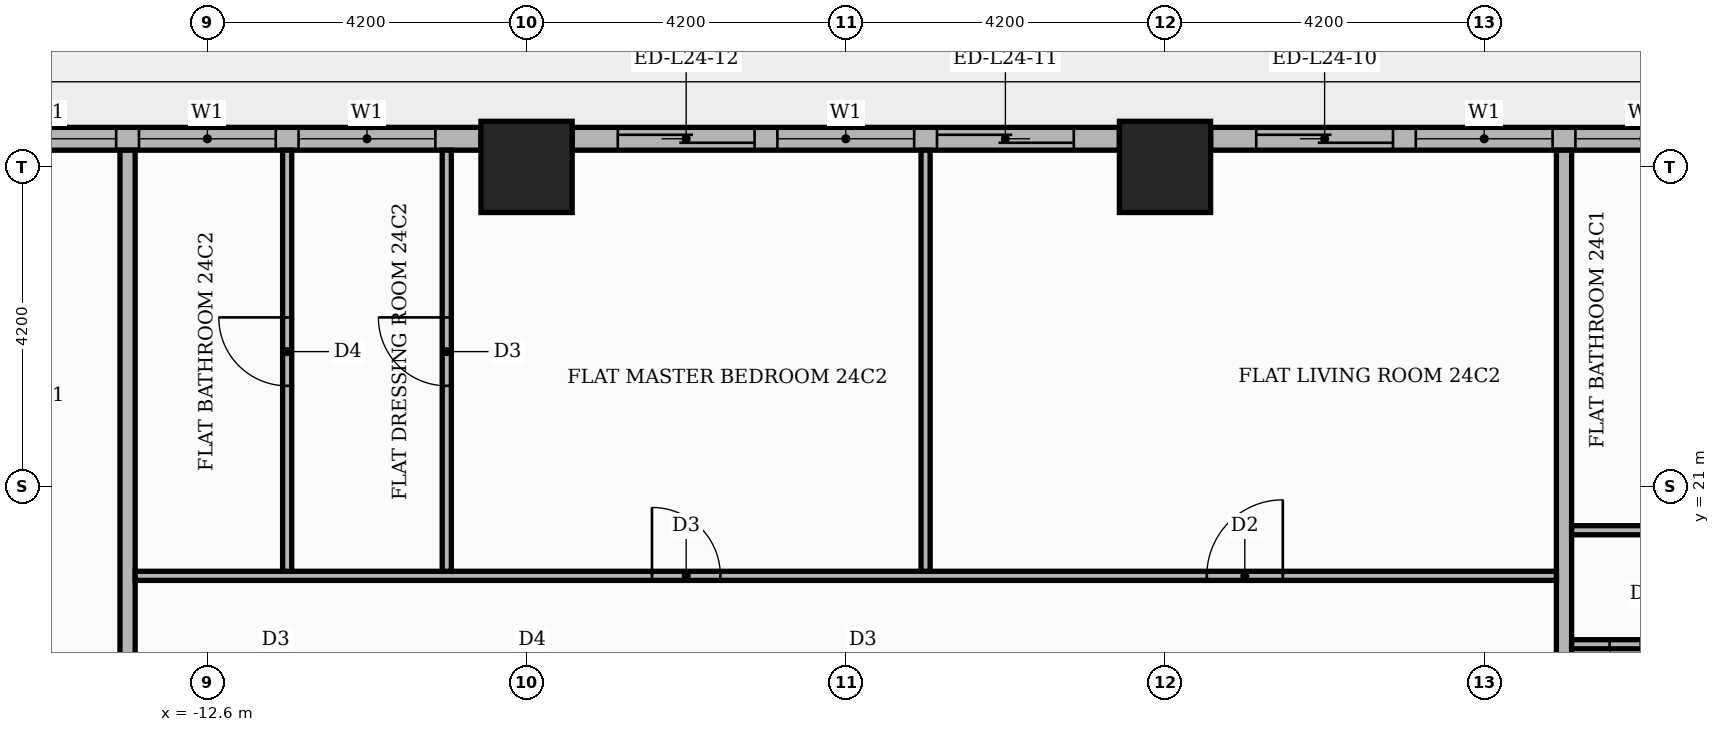
"""IFC4 building model, lengths in metres.
Left out: names, types, materials, properties, quantities, classifications, styles, units other than length and angle.
Written with IfcOpenShell. Run it as: python <this file> out.ifc"""

import sys

from ifc_helpers import new_model, si_unit, direction, frame, frame_2d, origin, origin_2d, place, context, subcontext, project, spatial, rectangle, extrude, element, fill, save


model = new_model("IFC4")
c1 = context("Model", 3, precision=1e-05, world=origin(), true_north=direction((0.0, 1.0)))
c2 = subcontext(c1, "Body", "Model", "MODEL_VIEW")
j1 = project(units=[si_unit("LENGTHUNIT", "METRE"), si_unit("PLANEANGLEUNIT", "RADIAN")], contexts=[c1])
p1 = place(None, origin())
s1 = spatial("IfcSite", under=j1, at=p1, CompositionType="ELEMENT")
p2 = place(p1, origin())
s2 = spatial("IfcBuilding", under=s1, at=p2, CompositionType="ELEMENT")
p3 = place(p2, frame((0.0, 0.0, 102.6)))
s3 = spatial("IfcBuildingStorey", under=s2, at=p3, CompositionType="ELEMENT", Elevation=102.6)
for number, where, z_axis, x_axis in (
    (1, (0.0, 25.2, 0.0), (0.0, 0.0, 1.0), (1.0, 0.0, 0.0)),
    (2, (-8.4, 25.2, 0.0), (0.0, 0.0, 1.0), (1.0, 0.0, 0.0)),
):
    element("IfcColumn", number, at=place(p3, frame(where, z_axis=z_axis, x_axis=x_axis)), inside=s3, PredefinedType="COLUMN", context=c2, shape_type="SweptSolid", body=[
        extrude(rectangle(XDim=1.2, YDim=1.2, at=origin_2d()), origin(), (0.0, 0.0, 1.0), 3.9),
    ])
p4 = place(p3, frame((7.8, 25.57, 0.0), z_axis=(0.0, 0.0, 1.0), x_axis=(-1.0, 0.0, 0.0)))
e3 = element("IfcWall", 3, at=p4, inside=s3, PredefinedType="STANDARD", context=c2, shape_type="SweptSolid", body=[
    extrude(rectangle(XDim=7.2, YDim=0.3, at=frame_2d((3.6, 0.0))), origin(), (0.0, 0.0, 1.0), 3.48),
])
p5 = place(p4, frame((0.6, 0.0, 0.9)))
e4 = element("IfcOpeningElement", 4, at=p5, cuts=e3, PredefinedType="OPENING", context=c2, shape_type="SweptSolid", body=[
    extrude(rectangle(XDim=1.8, YDim=2.1, at=frame_2d((0.9, 1.05))), frame((0.0, 0.16, 0.0), z_axis=(0.0, -1.0, 0.0), x_axis=(1.0, 0.0, 0.0)), (0.0, 0.0, 1.0), 0.32),
])
p6 = place(p4, frame((2.7, 0.0, 0.9)))
e5 = element("IfcOpeningElement", 5, at=p6, cuts=e3, PredefinedType="OPENING", context=c2, shape_type="SweptSolid", body=[
    extrude(rectangle(XDim=1.8, YDim=2.1, at=frame_2d((0.9, 1.05))), frame((0.0, 0.16, 0.0), z_axis=(0.0, -1.0, 0.0), x_axis=(1.0, 0.0, 0.0)), (0.0, 0.0, 1.0), 0.32),
])
p7 = place(p4, frame((4.8, 0.0, 0.0)))
e6 = element("IfcOpeningElement", 6, at=p7, cuts=e3, PredefinedType="OPENING", context=c2, shape_type="SweptSolid", body=[
    extrude(rectangle(XDim=1.8, YDim=2.4, at=frame_2d((0.9, 1.2))), frame((0.0, 0.16, 0.0), z_axis=(0.0, -1.0, 0.0), x_axis=(1.0, 0.0, 0.0)), (0.0, 0.0, 1.0), 0.32),
])
p8 = place(p3, frame((-0.6, 25.57, 0.0), z_axis=(0.0, 0.0, 1.0), x_axis=(-1.0, 0.0, 0.0)))
e7 = element("IfcWall", 7, at=p8, inside=s3, PredefinedType="STANDARD", context=c2, shape_type="SweptSolid", body=[
    extrude(rectangle(XDim=7.2, YDim=0.3, at=frame_2d((3.6, 0.0))), origin(), (0.0, 0.0, 1.0), 3.48),
])
p9 = place(p8, frame((0.6, 0.0, 0.0)))
e8 = element("IfcOpeningElement", 8, at=p9, cuts=e7, PredefinedType="OPENING", context=c2, shape_type="SweptSolid", body=[
    extrude(rectangle(XDim=1.8, YDim=2.4, at=frame_2d((0.9, 1.2))), frame((0.0, 0.16, 0.0), z_axis=(0.0, -1.0, 0.0), x_axis=(1.0, 0.0, 0.0)), (0.0, 0.0, 1.0), 0.32),
])
p10 = place(p8, frame((2.7, 0.0, 0.9)))
e9 = element("IfcOpeningElement", 9, at=p10, cuts=e7, PredefinedType="OPENING", context=c2, shape_type="SweptSolid", body=[
    extrude(rectangle(XDim=1.8, YDim=2.1, at=frame_2d((0.9, 1.05))), frame((0.0, 0.16, 0.0), z_axis=(0.0, -1.0, 0.0), x_axis=(1.0, 0.0, 0.0)), (0.0, 0.0, 1.0), 0.32),
])
p11 = place(p8, frame((4.8, 0.0, 0.0)))
e10 = element("IfcOpeningElement", 10, at=p11, cuts=e7, PredefinedType="OPENING", context=c2, shape_type="SweptSolid", body=[
    extrude(rectangle(XDim=1.8, YDim=2.4, at=frame_2d((0.9, 1.2))), frame((0.0, 0.16, 0.0), z_axis=(0.0, -1.0, 0.0), x_axis=(1.0, 0.0, 0.0)), (0.0, 0.0, 1.0), 0.32),
])
p12 = place(p3, frame((-9.0, 25.57, 0.0), z_axis=(0.0, 0.0, 1.0), x_axis=(-1.0, 0.0, 0.0)))
e11 = element("IfcWall", 11, at=p12, inside=s3, PredefinedType="STANDARD", context=c2, shape_type="SweptSolid", body=[
    extrude(rectangle(XDim=7.2, YDim=0.3, at=frame_2d((3.6, 0.0))), origin(), (0.0, 0.0, 1.0), 3.48),
])
p13 = place(p12, frame((0.6, 0.0, 0.9)))
e12 = element("IfcOpeningElement", 12, at=p13, cuts=e11, PredefinedType="OPENING", context=c2, shape_type="SweptSolid", body=[
    extrude(rectangle(XDim=1.8, YDim=2.1, at=frame_2d((0.9, 1.05))), frame((0.0, 0.16, 0.0), z_axis=(0.0, -1.0, 0.0), x_axis=(1.0, 0.0, 0.0)), (0.0, 0.0, 1.0), 0.32),
])
p14 = place(p12, frame((2.7, 0.0, 0.9)))
e13 = element("IfcOpeningElement", 13, at=p14, cuts=e11, PredefinedType="OPENING", context=c2, shape_type="SweptSolid", body=[
    extrude(rectangle(XDim=1.8, YDim=2.1, at=frame_2d((0.9, 1.05))), frame((0.0, 0.16, 0.0), z_axis=(0.0, -1.0, 0.0), x_axis=(1.0, 0.0, 0.0)), (0.0, 0.0, 1.0), 0.32),
])
p15 = place(p12, frame((4.8, 0.0, 0.9)))
e14 = element("IfcOpeningElement", 14, at=p15, cuts=e11, PredefinedType="OPENING", context=c2, shape_type="SweptSolid", body=[
    extrude(rectangle(XDim=1.8, YDim=2.1, at=frame_2d((0.9, 1.05))), frame((0.0, 0.16, 0.0), z_axis=(0.0, -1.0, 0.0), x_axis=(1.0, 0.0, 0.0)), (0.0, 0.0, 1.0), 0.32),
])
for number, where, z_axis, x_axis in (
    (15, (-13.65, 13.75, 0.0), (0.0, 0.0, 1.0), (0.0, 1.0, 0.0)),
    (16, (5.25, 13.75, 0.0), (0.0, 0.0, 1.0), (0.0, 1.0, 0.0)),
):
    element("IfcWall", number, at=place(p3, frame(where, z_axis=z_axis, x_axis=x_axis)), inside=s3, PredefinedType="PARTITIONING", context=c2, shape_type="SweptSolid", body=[
        extrude(rectangle(XDim=11.67, YDim=0.2, at=frame_2d((5.835, 0.0))), origin(), (0.0, 0.0, 1.0), 3.48),
    ])
p16 = place(p3, frame((5.35, 18.92, 0.0), z_axis=(0.0, 0.0, 1.0), x_axis=(1.0, 0.0, 0.0)))
e17 = element("IfcWall", 17, at=p16, inside=s3, PredefinedType="PARTITIONING", context=c2, shape_type="SweptSolid", body=[
    extrude(rectangle(XDim=4.1, YDim=0.12, at=frame_2d((2.05, 0.0))), origin(), (0.0, 0.0, 1.0), 3.48),
])
p17 = place(p16, frame((0.5, 0.0, 0.0)))
e18 = element("IfcOpeningElement", 18, at=p17, cuts=e17, PredefinedType="OPENING", context=c2, shape_type="SweptSolid", body=[
    extrude(rectangle(XDim=0.9, YDim=2.1, at=frame_2d((0.45, 1.05))), frame((0.0, 0.07, 0.0), z_axis=(0.0, -1.0, 0.0), x_axis=(1.0, 0.0, 0.0)), (0.0, 0.0, 1.0), 0.14),
])
p18 = place(p3, frame((-13.55, 19.82, 0.0), z_axis=(0.0, 0.0, 1.0), x_axis=(1.0, 0.0, 0.0)))
e19 = element("IfcWall", 19, at=p18, inside=s3, PredefinedType="PARTITIONING", context=c2, shape_type="SweptSolid", body=[
    extrude(rectangle(XDim=18.7, YDim=0.12, at=frame_2d((9.35, 0.0))), origin(), (0.0, 0.0, 1.0), 3.48),
])
p19 = place(p18, frame((14.1, 0.0, 0.0)))
e20 = element("IfcOpeningElement", 20, at=p19, cuts=e19, PredefinedType="OPENING", context=c2, shape_type="SweptSolid", body=[
    extrude(rectangle(XDim=1.0, YDim=2.1, at=frame_2d((0.5, 1.05))), frame((0.0, 0.07, 0.0), z_axis=(0.0, -1.0, 0.0), x_axis=(1.0, 0.0, 0.0)), (0.0, 0.0, 1.0), 0.14),
])
p20 = place(p18, frame((6.8, 0.0, 0.0)))
e21 = element("IfcOpeningElement", 21, at=p20, cuts=e19, PredefinedType="OPENING", context=c2, shape_type="SweptSolid", body=[
    extrude(rectangle(XDim=0.9, YDim=2.1, at=frame_2d((0.45, 1.05))), frame((0.0, 0.07, 0.0), z_axis=(0.0, -1.0, 0.0), x_axis=(1.0, 0.0, 0.0)), (0.0, 0.0, 1.0), 0.14),
])
p21 = place(p3, frame((-11.55, 19.88, 0.0), z_axis=(0.0, 0.0, 1.0), x_axis=(0.0, 1.0, 0.0)))
e22 = element("IfcWall", 22, at=p21, inside=s3, PredefinedType="PARTITIONING", context=c2, shape_type="SweptSolid", body=[
    extrude(rectangle(XDim=5.54, YDim=0.12, at=frame_2d((2.77, 0.0))), origin(), (0.0, 0.0, 1.0), 3.48),
])
p22 = place(p21, frame((2.44, 0.0, 0.0)))
e23 = element("IfcOpeningElement", 23, at=p22, cuts=e22, PredefinedType="OPENING", context=c2, shape_type="SweptSolid", body=[
    extrude(rectangle(XDim=0.9, YDim=2.1, at=frame_2d((0.45, 1.05))), frame((0.0, 0.07, 0.0), z_axis=(0.0, -1.0, 0.0), x_axis=(1.0, 0.0, 0.0)), (0.0, 0.0, 1.0), 0.14),
])
p23 = place(p3, frame((-9.45, 19.88, 0.0), z_axis=(0.0, 0.0, 1.0), x_axis=(0.0, 1.0, 0.0)))
e24 = element("IfcWall", 24, at=p23, inside=s3, PredefinedType="PARTITIONING", context=c2, shape_type="SweptSolid", body=[
    extrude(rectangle(XDim=5.54, YDim=0.12, at=frame_2d((2.77, 0.0))), origin(), (0.0, 0.0, 1.0), 3.48),
])
p24 = place(p23, frame((2.44, 0.0, 0.0)))
e25 = element("IfcOpeningElement", 25, at=p24, cuts=e24, PredefinedType="OPENING", context=c2, shape_type="SweptSolid", body=[
    extrude(rectangle(XDim=0.9, YDim=2.1, at=frame_2d((0.45, 1.05))), frame((0.0, 0.07, 0.0), z_axis=(0.0, -1.0, 0.0), x_axis=(1.0, 0.0, 0.0)), (0.0, 0.0, 1.0), 0.14),
])
p25 = place(p3, frame((-3.15, 19.88, 0.0), z_axis=(0.0, 0.0, 1.0), x_axis=(0.0, 1.0, 0.0)))
e26 = element("IfcWall", 26, at=p25, inside=s3, PredefinedType="PARTITIONING", context=c2, shape_type="SweptSolid", body=[
    extrude(rectangle(XDim=5.54, YDim=0.12, at=frame_2d((2.77, 0.0))), origin(), (0.0, 0.0, 1.0), 3.48),
])
p26 = place(p3, frame((5.35, 20.42, 0.0), z_axis=(0.0, 0.0, 1.0), x_axis=(1.0, 0.0, 0.0)))
e27 = element("IfcWall", 27, at=p26, inside=s3, PredefinedType="PARTITIONING", context=c2, shape_type="SweptSolid", body=[
    extrude(rectangle(XDim=20.07, YDim=0.12, at=frame_2d((10.035, 0.0))), origin(), (0.0, 0.0, 1.0), 3.48),
])
p27 = place(p26, frame((8.85, 0.0, 0.0)))
e28 = element("IfcOpeningElement", 28, at=p27, cuts=e27, PredefinedType="OPENING", context=c2, shape_type="SweptSolid", body=[
    extrude(rectangle(XDim=1.0, YDim=2.1, at=frame_2d((0.5, 1.05))), frame((0.0, 0.07, 0.0), z_axis=(0.0, -1.0, 0.0), x_axis=(1.0, 0.0, 0.0)), (0.0, 0.0, 1.0), 0.14),
])
p28 = place(p26, frame((5.75, 0.0, 0.0)))
e29 = element("IfcOpeningElement", 29, at=p28, cuts=e27, PredefinedType="OPENING", context=c2, shape_type="SweptSolid", body=[
    extrude(rectangle(XDim=0.9, YDim=2.1, at=frame_2d((0.45, 1.05))), frame((0.0, 0.07, 0.0), z_axis=(0.0, -1.0, 0.0), x_axis=(1.0, 0.0, 0.0)), (0.0, 0.0, 1.0), 0.14),
])
p29 = place(p5, origin())
e30 = element("IfcWindow", 30, at=p29, inside=s3, PartitioningType="SINGLE_PANEL", PredefinedType="WINDOW", context=c2, shape_type="SweptSolid", body=[
    extrude(rectangle(XDim=1.8, YDim=2.1, at=frame_2d((0.9, 1.05))), frame((0.0, 0.03, 0.0), z_axis=(0.0, -1.0, 0.0), x_axis=(1.0, 0.0, 0.0)), (0.0, 0.0, 1.0), 0.06),
])
fill(e4, e30)
p30 = place(p6, origin())
e31 = element("IfcWindow", 31, at=p30, inside=s3, PartitioningType="SINGLE_PANEL", PredefinedType="WINDOW", context=c2, shape_type="SweptSolid", body=[
    extrude(rectangle(XDim=1.8, YDim=2.1, at=frame_2d((0.9, 1.05))), frame((0.0, 0.03, 0.0), z_axis=(0.0, -1.0, 0.0), x_axis=(1.0, 0.0, 0.0)), (0.0, 0.0, 1.0), 0.06),
])
fill(e5, e31)
p31 = place(p7, origin())
e32 = element("IfcDoor", 32, at=p31, inside=s3, OperationType="SLIDING_TO_RIGHT", PredefinedType="DOOR", context=c2, shape_type="SweptSolid", body=[
    extrude(rectangle(XDim=1.8, YDim=2.4, at=frame_2d((0.9, 1.2))), frame((0.0, 0.025, 0.0), z_axis=(0.0, -1.0, 0.0), x_axis=(1.0, 0.0, 0.0)), (0.0, 0.0, 1.0), 0.05),
])
fill(e6, e32)
p32 = place(p9, origin())
e33 = element("IfcDoor", 33, at=p32, inside=s3, OperationType="SLIDING_TO_LEFT", PredefinedType="DOOR", context=c2, shape_type="SweptSolid", body=[
    extrude(rectangle(XDim=1.8, YDim=2.4, at=frame_2d((0.9, 1.2))), frame((0.0, 0.025, 0.0), z_axis=(0.0, -1.0, 0.0), x_axis=(1.0, 0.0, 0.0)), (0.0, 0.0, 1.0), 0.05),
])
fill(e8, e33)
p33 = place(p10, origin())
e34 = element("IfcWindow", 34, at=p33, inside=s3, PartitioningType="SINGLE_PANEL", PredefinedType="WINDOW", context=c2, shape_type="SweptSolid", body=[
    extrude(rectangle(XDim=1.8, YDim=2.1, at=frame_2d((0.9, 1.05))), frame((0.0, 0.03, 0.0), z_axis=(0.0, -1.0, 0.0), x_axis=(1.0, 0.0, 0.0)), (0.0, 0.0, 1.0), 0.06),
])
fill(e9, e34)
p34 = place(p11, origin())
e35 = element("IfcDoor", 35, at=p34, inside=s3, OperationType="SLIDING_TO_RIGHT", PredefinedType="DOOR", context=c2, shape_type="SweptSolid", body=[
    extrude(rectangle(XDim=1.8, YDim=2.4, at=frame_2d((0.9, 1.2))), frame((0.0, 0.025, 0.0), z_axis=(0.0, -1.0, 0.0), x_axis=(1.0, 0.0, 0.0)), (0.0, 0.0, 1.0), 0.05),
])
fill(e10, e35)
p35 = place(p13, origin())
e36 = element("IfcWindow", 36, at=p35, inside=s3, PartitioningType="SINGLE_PANEL", PredefinedType="WINDOW", context=c2, shape_type="SweptSolid", body=[
    extrude(rectangle(XDim=1.8, YDim=2.1, at=frame_2d((0.9, 1.05))), frame((0.0, 0.03, 0.0), z_axis=(0.0, -1.0, 0.0), x_axis=(1.0, 0.0, 0.0)), (0.0, 0.0, 1.0), 0.06),
])
fill(e12, e36)
p36 = place(p14, origin())
e37 = element("IfcWindow", 37, at=p36, inside=s3, PartitioningType="SINGLE_PANEL", PredefinedType="WINDOW", context=c2, shape_type="SweptSolid", body=[
    extrude(rectangle(XDim=1.8, YDim=2.1, at=frame_2d((0.9, 1.05))), frame((0.0, 0.03, 0.0), z_axis=(0.0, -1.0, 0.0), x_axis=(1.0, 0.0, 0.0)), (0.0, 0.0, 1.0), 0.06),
])
fill(e13, e37)
p37 = place(p15, origin())
e38 = element("IfcWindow", 38, at=p37, inside=s3, PartitioningType="SINGLE_PANEL", PredefinedType="WINDOW", context=c2, shape_type="SweptSolid", body=[
    extrude(rectangle(XDim=1.8, YDim=2.1, at=frame_2d((0.9, 1.05))), frame((0.0, 0.03, 0.0), z_axis=(0.0, -1.0, 0.0), x_axis=(1.0, 0.0, 0.0)), (0.0, 0.0, 1.0), 0.06),
])
fill(e14, e38)
p38 = place(p17, frame((0.9, 0.0, 0.0), z_axis=(0.0, 0.0, 1.0), x_axis=(-1.0, 0.0, 0.0)))
e39 = element("IfcDoor", 39, at=p38, inside=s3, OperationType="SINGLE_SWING_RIGHT", PredefinedType="DOOR", context=c2, shape_type="SweptSolid", body=[
    extrude(rectangle(XDim=0.9, YDim=2.1, at=frame_2d((0.45, 1.05))), frame((0.0, 0.025, 0.0), z_axis=(0.0, -1.0, 0.0), x_axis=(1.0, 0.0, 0.0)), (0.0, 0.0, 1.0), 0.05),
])
fill(e18, e39)
p39 = place(p19, origin())
e40 = element("IfcDoor", 40, at=p39, inside=s3, OperationType="SINGLE_SWING_RIGHT", PredefinedType="DOOR", context=c2, shape_type="SweptSolid", body=[
    extrude(rectangle(XDim=1.0, YDim=2.1, at=frame_2d((0.5, 1.05))), frame((0.0, 0.025, 0.0), z_axis=(0.0, -1.0, 0.0), x_axis=(1.0, 0.0, 0.0)), (0.0, 0.0, 1.0), 0.05),
])
fill(e20, e40)
p40 = place(p20, origin())
e41 = element("IfcDoor", 41, at=p40, inside=s3, OperationType="SINGLE_SWING_LEFT", PredefinedType="DOOR", context=c2, shape_type="SweptSolid", body=[
    extrude(rectangle(XDim=0.9, YDim=2.1, at=frame_2d((0.45, 1.05))), frame((0.0, 0.025, 0.0), z_axis=(0.0, -1.0, 0.0), x_axis=(1.0, 0.0, 0.0)), (0.0, 0.0, 1.0), 0.05),
])
fill(e21, e41)
p41 = place(p24, origin())
e42 = element("IfcDoor", 42, at=p41, inside=s3, OperationType="SINGLE_SWING_RIGHT", PredefinedType="DOOR", context=c2, shape_type="SweptSolid", body=[
    extrude(rectangle(XDim=0.9, YDim=2.1, at=frame_2d((0.45, 1.05))), frame((0.0, 0.025, 0.0), z_axis=(0.0, -1.0, 0.0), x_axis=(1.0, 0.0, 0.0)), (0.0, 0.0, 1.0), 0.05),
])
fill(e25, e42)
p42 = place(p22, origin())
e43 = element("IfcDoor", 43, at=p42, inside=s3, OperationType="SINGLE_SWING_RIGHT", PredefinedType="DOOR", context=c2, shape_type="SweptSolid", body=[
    extrude(rectangle(XDim=0.9, YDim=2.1, at=frame_2d((0.45, 1.05))), frame((0.0, 0.025, 0.0), z_axis=(0.0, -1.0, 0.0), x_axis=(1.0, 0.0, 0.0)), (0.0, 0.0, 1.0), 0.05),
])
fill(e23, e43)
save(model, sys.argv[1])
